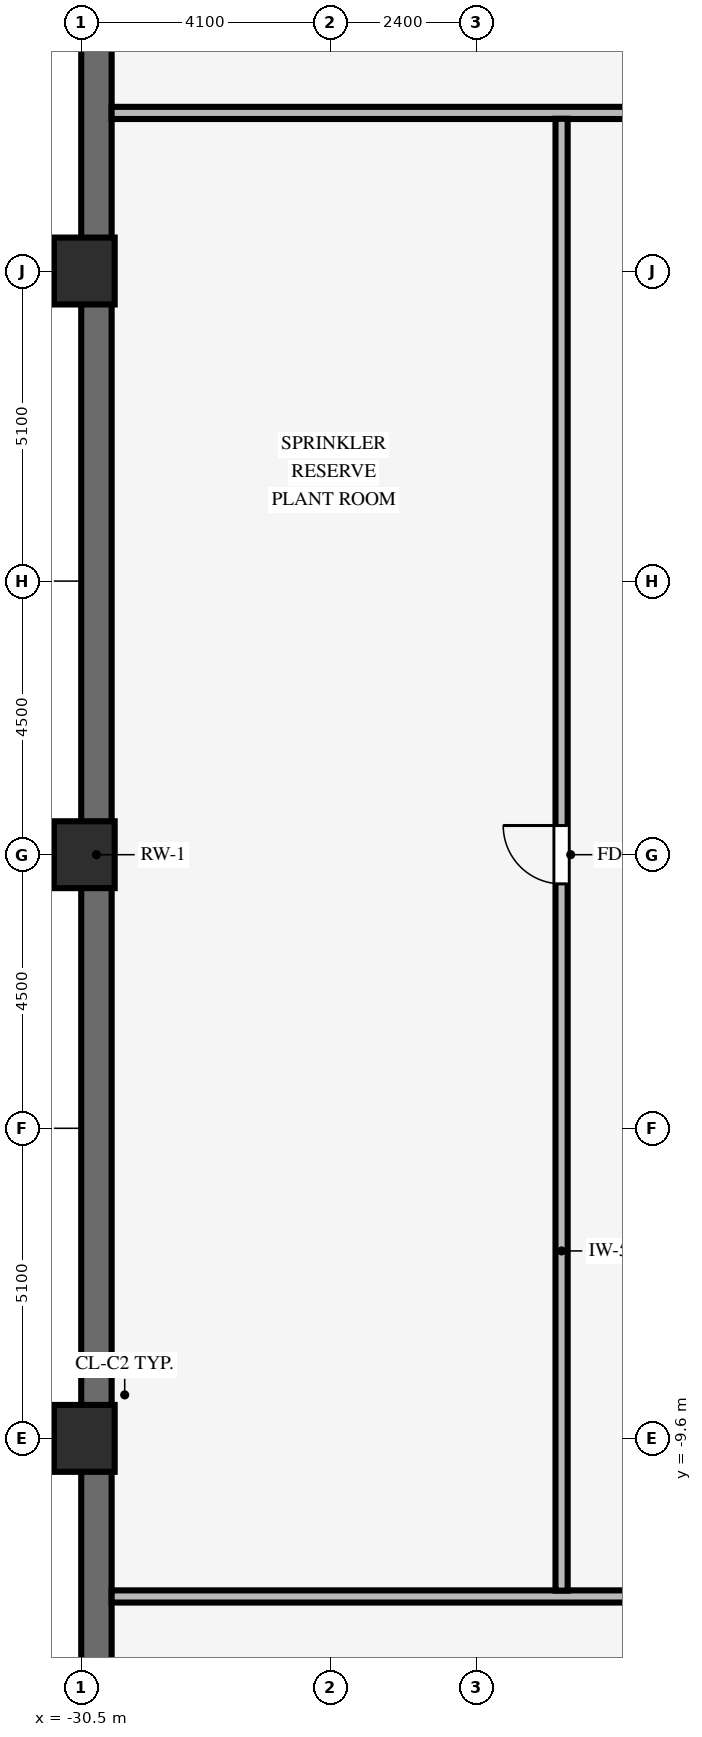
"""IFC4 building model, lengths in metres.
Left out: names, types, materials, properties, quantities, classifications, styles, units other than length and angle.
Written with IfcOpenShell. Run it as: python <this file> out.ifc"""

import sys

from ifc_helpers import new_model, si_unit, direction, frame, frame_2d, origin, origin_2d, place, context, subcontext, project, spatial, rectangle, extrude, source, transform, mapped, element, fill, save


model = new_model("IFC4")
c1 = context("Model", 3, precision=1e-05, world=origin(), true_north=direction((0.0, 1.0)))
c2 = subcontext(c1, "Body", "Model", "MODEL_VIEW")
j1 = project(units=[si_unit("LENGTHUNIT", "METRE"), si_unit("PLANEANGLEUNIT", "RADIAN")], contexts=[c1])
p1 = place(None, origin())
s1 = spatial("IfcSite", under=j1, at=p1, CompositionType="ELEMENT")
p2 = place(p1, origin())
s2 = spatial("IfcBuilding", under=s1, at=p2, CompositionType="ELEMENT")
p3 = place(p2, frame((0.0, 0.0, -8.4)))
s3 = spatial("IfcBuildingStorey", under=s2, at=p3, CompositionType="ELEMENT", Elevation=-8.4)
p4 = place(p3, frame((-30.25, -25.505, 0.0), z_axis=(0.0, 0.0, 1.0), x_axis=(0.0, 1.0, 0.0)))
e1 = element("IfcWall", 1, at=p4, inside=s3, PredefinedType="SOLIDWALL", context=c2, shape_type="SweptSolid", body=[
    extrude(rectangle(XDim=51.01, YDim=0.5, at=frame_2d((25.505, 0.0))), origin(), (0.0, 0.0, 1.0), 3.85),
])
for number, where, z_axis, x_axis in (
    (2, (-30.5, -9.6, 0.0), (0.0, 0.0, 1.0), (1.0, 0.0, 0.0)),
    (3, (-30.5, 0.0, 0.0), (0.0, 0.0, 1.0), (1.0, 0.0, 0.0)),
    (4, (-30.5, 9.6, 0.0), (0.0, 0.0, 1.0), (1.0, 0.0, 0.0)),
):
    element("IfcColumn", number, at=place(p3, frame(where, z_axis=z_axis, x_axis=x_axis)), inside=s3, PredefinedType="COLUMN", context=c2, shape_type="SweptSolid", body=[
        extrude(rectangle(XDim=1.1, YDim=1.1, at=origin_2d()), origin(), (0.0, 0.0, 1.0), 3.85),
    ])
p5 = place(p3, frame((-30.0, -12.2, 0.0), z_axis=(0.0, 0.0, 1.0), x_axis=(1.0, 0.0, 0.0)))
e5 = element("IfcWall", 5, at=p5, inside=s3, PredefinedType="STANDARD", context=c2, shape_type="SweptSolid", body=[
    extrude(rectangle(XDim=60.0, YDim=0.2, at=frame_2d((30.0, 0.0))), origin(), (0.0, 0.0, 1.0), 3.84),
])
p6 = place(p5, frame((15.12, 0.0, 0.0)))
e6 = element("IfcOpeningElement", 6, at=p6, cuts=e5, PredefinedType="OPENING", context=c2, shape_type="SweptSolid", body=[
    extrude(rectangle(XDim=0.96, YDim=2.1, at=frame_2d((0.48, 1.05))), frame((0.0, 0.11, 0.0), z_axis=(0.0, -1.0, 0.0), x_axis=(1.0, 0.0, 0.0)), (0.0, 0.0, 1.0), 0.22),
])
p7 = place(p5, frame((43.92, 0.0, 0.0)))
e7 = element("IfcOpeningElement", 7, at=p7, cuts=e5, PredefinedType="OPENING", context=c2, shape_type="SweptSolid", body=[
    extrude(rectangle(XDim=0.96, YDim=2.1, at=frame_2d((0.48, 1.05))), frame((0.0, 0.11, 0.0), z_axis=(0.0, -1.0, 0.0), x_axis=(1.0, 0.0, 0.0)), (0.0, 0.0, 1.0), 0.22),
])
p8 = place(p3, frame((-30.0, 12.2, 0.0), z_axis=(0.0, 0.0, 1.0), x_axis=(1.0, 0.0, 0.0)))
e8 = element("IfcWall", 8, at=p8, inside=s3, PredefinedType="STANDARD", context=c2, shape_type="SweptSolid", body=[
    extrude(rectangle(XDim=60.0, YDim=0.2, at=frame_2d((30.0, 0.0))), origin(), (0.0, 0.0, 1.0), 3.84),
])
p9 = place(p8, frame((15.12, 0.0, 0.0)))
e9 = element("IfcOpeningElement", 9, at=p9, cuts=e8, PredefinedType="OPENING", context=c2, shape_type="SweptSolid", body=[
    extrude(rectangle(XDim=0.96, YDim=2.1, at=frame_2d((0.48, 1.05))), frame((0.0, 0.11, 0.0), z_axis=(0.0, -1.0, 0.0), x_axis=(1.0, 0.0, 0.0)), (0.0, 0.0, 1.0), 0.22),
])
p10 = place(p8, frame((43.92, 0.0, 0.0)))
e10 = element("IfcOpeningElement", 10, at=p10, cuts=e8, PredefinedType="OPENING", context=c2, shape_type="SweptSolid", body=[
    extrude(rectangle(XDim=0.96, YDim=2.1, at=frame_2d((0.48, 1.05))), frame((0.0, 0.11, 0.0), z_axis=(0.0, -1.0, 0.0), x_axis=(1.0, 0.0, 0.0)), (0.0, 0.0, 1.0), 0.22),
])
p11 = place(p3, frame((-22.6, -12.104, 0.0), z_axis=(0.0, 0.0, 1.0), x_axis=(0.0, 1.0, 0.0)))
e11 = element("IfcWall", 11, at=p11, inside=s3, PredefinedType="STANDARD", context=c2, shape_type="SweptSolid", body=[
    extrude(rectangle(XDim=24.208, YDim=0.2, at=frame_2d((12.104, 0.0))), origin(), (0.0, 0.0, 1.0), 3.84),
])
p12 = place(p11, frame((11.624, 0.0, 0.0)))
e12 = element("IfcOpeningElement", 12, at=p12, cuts=e11, PredefinedType="OPENING", context=c2, shape_type="SweptSolid", body=[
    extrude(rectangle(XDim=0.96, YDim=2.1, at=frame_2d((0.48, 1.05))), frame((0.0, 0.11, 0.0), z_axis=(0.0, -1.0, 0.0), x_axis=(1.0, 0.0, 0.0)), (0.0, 0.0, 1.0), 0.22),
])
m1 = source(origin(), c2, "Body", "SweptSolid", [
    extrude(rectangle(XDim=0.96, YDim=2.1, at=frame_2d((0.48, 1.05))), frame((0.0, 0.025, 0.0), z_axis=(0.0, -1.0, 0.0), x_axis=(1.0, 0.0, 0.0)), (0.0, 0.0, 1.0), 0.05),
])
p13 = place(p12, origin())
e13 = element("IfcDoor", 13, at=p13, inside=s3, OperationType="SINGLE_SWING_RIGHT", PredefinedType="DOOR", context=c2, shape_type="MappedRepresentation", body=[
    mapped(m1, transform((0.0, 0.0, 0.0), scale=1.0)),
])
fill(e12, e13)
save(model, sys.argv[1])
